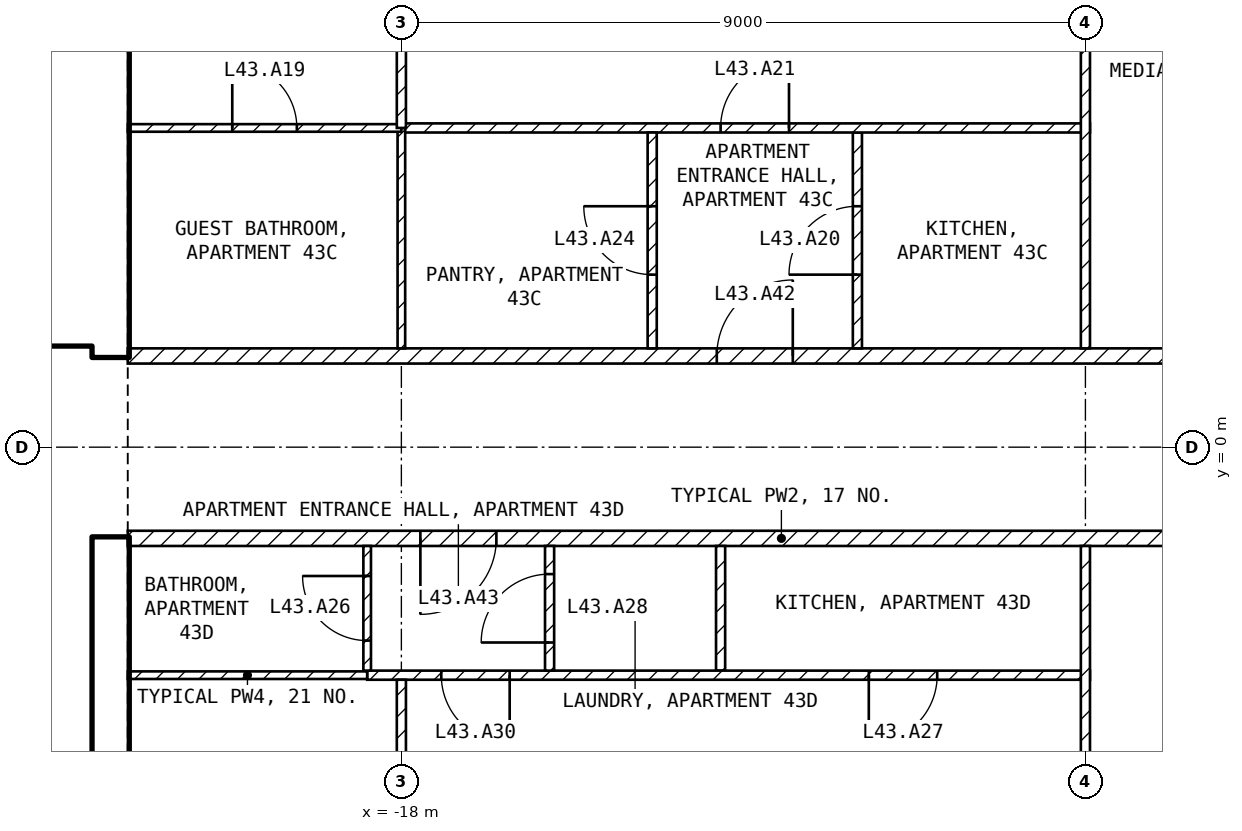
"""IFC4 building model, lengths in metres.
Left out: names, types, materials, properties, quantities, classifications, styles, units other than length and angle.
Written with IfcOpenShell. Run it as: python <this file> out.ifc"""

import sys

from ifc_helpers import new_model, si_unit, direction, frame, frame_2d, origin, place, context, subcontext, project, spatial, rectangle, extrude, element, fill, save


model = new_model("IFC4")
c1 = context("Model", 3, precision=1e-05, world=origin(), true_north=direction((0.0, 1.0)))
c2 = subcontext(c1, "Body", "Model", "MODEL_VIEW")
j1 = project(units=[si_unit("LENGTHUNIT", "METRE"), si_unit("PLANEANGLEUNIT", "RADIAN")], contexts=[c1])
p1 = place(None, origin())
s1 = spatial("IfcSite", under=j1, at=p1, CompositionType="ELEMENT")
p2 = place(p1, origin())
s2 = spatial("IfcBuilding", under=s1, at=p2, CompositionType="ELEMENT")
p3 = place(p2, frame((0.0, 0.0, 177.1)))
s3 = spatial("IfcBuildingStorey", under=s2, at=p3, CompositionType="ELEMENT", Elevation=177.1)
for number, where, z_axis, x_axis in (
    (1, (-21.825, -8.1, 0.0), (0.0, 0.0, 1.0), (0.0, 1.0, 0.0)),
    (2, (-21.825, 1.2, 0.0), (0.0, 0.0, 1.0), (0.0, 1.0, 0.0)),
):
    element("IfcWall", number, at=place(p3, frame(where, z_axis=z_axis, x_axis=x_axis)), inside=s3, PredefinedType="SHEAR", context=c2, shape_type="SweptSolid", body=[
        extrude(rectangle(XDim=6.9, YDim=0.45, at=frame_2d((3.45, 0.0))), origin(), (0.0, 0.0, 1.0), 3.25),
    ])
p4 = place(p3, frame((-33.2, 1.45, 0.0), z_axis=(0.0, 0.0, 1.0), x_axis=(1.0, 0.0, 0.0)))
e3 = element("IfcWall", 3, at=p4, inside=s3, PredefinedType="SOLIDWALL", context=c2, shape_type="SweptSolid", body=[
    extrude(rectangle(XDim=11.15, YDim=0.2, at=frame_2d((5.575, 0.0))), origin(), (0.0, 0.0, 1.0), 3.25),
])
p5 = place(p4, frame((9.4, 0.0, 0.0)))
e4 = element("IfcOpeningElement", 4, at=p5, cuts=e3, PredefinedType="OPENING", context=c2, shape_type="SweptSolid", body=[
    extrude(rectangle(XDim=1.0, YDim=2.1, at=frame_2d((0.5, 1.05))), frame((0.0, 0.11, 0.0), z_axis=(0.0, -1.0, 0.0), x_axis=(1.0, 0.0, 0.0)), (0.0, 0.0, 1.0), 0.22),
])
p6 = place(p4, frame((6.9, 0.0, 0.0)))
e5 = element("IfcOpeningElement", 5, at=p6, cuts=e3, PredefinedType="OPENING", context=c2, shape_type="SweptSolid", body=[
    extrude(rectangle(XDim=1.0, YDim=2.1, at=frame_2d((0.5, 1.05))), frame((0.0, 0.11, 0.0), z_axis=(0.0, -1.0, 0.0), x_axis=(1.0, 0.0, 0.0)), (0.0, 0.0, 1.0), 0.22),
])
p7 = place(p4, frame((1.1, 0.0, 0.0)))
e6 = element("IfcOpeningElement", 6, at=p7, cuts=e3, PredefinedType="OPENING", context=c2, shape_type="SweptSolid", body=[
    extrude(rectangle(XDim=0.9, YDim=2.1, at=frame_2d((0.45, 1.05))), frame((0.0, 0.11, 0.0), z_axis=(0.0, -1.0, 0.0), x_axis=(1.0, 0.0, 0.0)), (0.0, 0.0, 1.0), 0.22),
])
p8 = place(p3, frame((-28.35, 5.15, 0.0), z_axis=(0.0, 0.0, 1.0), x_axis=(1.0, 0.0, 0.0)))
e7 = element("IfcWall", 7, at=p8, inside=s3, PredefinedType="SOLIDWALL", context=c2, shape_type="SweptSolid", body=[
    extrude(rectangle(XDim=6.3, YDim=0.2, at=frame_2d((3.15, 0.0))), origin(), (0.0, 0.0, 1.0), 3.25),
])
p9 = place(p8, frame((5.1, 0.0, 0.0)))
e8 = element("IfcOpeningElement", 8, at=p9, cuts=e7, PredefinedType="OPENING", context=c2, shape_type="SweptSolid", body=[
    extrude(rectangle(XDim=1.0, YDim=2.1, at=frame_2d((0.5, 1.05))), frame((0.0, 0.11, 0.0), z_axis=(0.0, -1.0, 0.0), x_axis=(1.0, 0.0, 0.0)), (0.0, 0.0, 1.0), 0.22),
])
p10 = place(p3, frame((-21.6, 1.2, 0.0), z_axis=(0.0, 0.0, 1.0), x_axis=(1.0, 0.0, 0.0)))
e9 = element("IfcWall", 9, at=p10, inside=s3, PredefinedType="PARTITIONING", context=c2, shape_type="SweptSolid", body=[
    extrude(rectangle(XDim=17.2, YDim=0.2, at=frame_2d((8.6, 0.0))), origin(), (0.0, 0.0, 1.0), 3.25),
])
p11 = place(p10, frame((7.75, 0.0, 0.0)))
e10 = element("IfcOpeningElement", 10, at=p11, cuts=e9, PredefinedType="OPENING", context=c2, shape_type="SweptSolid", body=[
    extrude(rectangle(XDim=1.0, YDim=2.1, at=frame_2d((0.5, 1.05))), frame((0.0, 0.11, 0.0), z_axis=(0.0, -1.0, 0.0), x_axis=(1.0, 0.0, 0.0)), (0.0, 0.0, 1.0), 0.22),
])
p12 = place(p3, frame((-4.4, -1.2, 0.0), z_axis=(0.0, 0.0, 1.0), x_axis=(-1.0, 0.0, 0.0)))
e11 = element("IfcWall", 11, at=p12, inside=s3, PredefinedType="PARTITIONING", context=c2, shape_type="SweptSolid", body=[
    extrude(rectangle(XDim=17.2, YDim=0.2, at=frame_2d((8.6, 0.0))), origin(), (0.0, 0.0, 1.0), 3.25),
])
p13 = place(p12, frame((12.35, 0.0, 0.0)))
e12 = element("IfcOpeningElement", 12, at=p13, cuts=e11, PredefinedType="OPENING", context=c2, shape_type="SweptSolid", body=[
    extrude(rectangle(XDim=1.0, YDim=2.1, at=frame_2d((0.5, 1.05))), frame((0.0, 0.11, 0.0), z_axis=(0.0, -1.0, 0.0), x_axis=(1.0, 0.0, 0.0)), (0.0, 0.0, 1.0), 0.22),
])
p14 = place(p3, frame((-12.0, 1.3, 0.0), z_axis=(0.0, 0.0, 1.0), x_axis=(0.0, 1.0, 0.0)))
e13 = element("IfcWall", 13, at=p14, inside=s3, PredefinedType="PARTITIONING", context=c2, shape_type="SweptSolid", body=[
    extrude(rectangle(XDim=2.84, YDim=0.12, at=frame_2d((1.42, 0.0))), origin(), (0.0, 0.0, 1.0), 3.25),
])
p15 = place(p14, frame((0.97, 0.0, 0.0)))
e14 = element("IfcOpeningElement", 14, at=p15, cuts=e13, PredefinedType="OPENING", context=c2, shape_type="SweptSolid", body=[
    extrude(rectangle(XDim=0.9, YDim=2.1, at=frame_2d((0.45, 1.05))), frame((0.0, 0.07, 0.0), z_axis=(0.0, -1.0, 0.0), x_axis=(1.0, 0.0, 0.0)), (0.0, 0.0, 1.0), 0.14),
])
p16 = place(p3, frame((-18.0, 4.2, 0.0), z_axis=(0.0, 0.0, 1.0), x_axis=(1.0, 0.0, 0.0)))
e15 = element("IfcWall", 15, at=p16, inside=s3, PredefinedType="PARTITIONING", context=c2, shape_type="SweptSolid", body=[
    extrude(rectangle(XDim=9.06, YDim=0.12, at=frame_2d((4.53, 0.0))), origin(), (0.0, 0.0, 1.0), 3.25),
])
p17 = place(p16, frame((4.2, 0.0, 0.0)))
e16 = element("IfcOpeningElement", 16, at=p17, cuts=e15, PredefinedType="OPENING", context=c2, shape_type="SweptSolid", body=[
    extrude(rectangle(XDim=0.9, YDim=2.1, at=frame_2d((0.45, 1.05))), frame((0.0, 0.07, 0.0), z_axis=(0.0, -1.0, 0.0), x_axis=(1.0, 0.0, 0.0)), (0.0, 0.0, 1.0), 0.14),
])
p18 = place(p3, frame((-9.0, 8.92, 0.0), z_axis=(0.0, 0.0, 1.0), x_axis=(0.0, -1.0, 0.0)))
e17 = element("IfcWall", 17, at=p18, inside=s3, PredefinedType="PARTITIONING", context=c2, shape_type="SweptSolid", body=[
    extrude(rectangle(XDim=7.62, YDim=0.12, at=frame_2d((3.81, 0.0))), origin(), (0.0, 0.0, 1.0), 3.25),
])
p19 = place(p18, frame((2.52, 0.0, 0.0)))
e18 = element("IfcOpeningElement", 18, at=p19, cuts=e17, PredefinedType="OPENING", context=c2, shape_type="SweptSolid", body=[
    extrude(rectangle(XDim=0.9, YDim=2.1, at=frame_2d((0.45, 1.05))), frame((0.0, 0.07, 0.0), z_axis=(0.0, -1.0, 0.0), x_axis=(1.0, 0.0, 0.0)), (0.0, 0.0, 1.0), 0.14),
])
p20 = place(p3, frame((-14.7, 1.3, 0.0), z_axis=(0.0, 0.0, 1.0), x_axis=(0.0, 1.0, 0.0)))
e19 = element("IfcWall", 19, at=p20, inside=s3, PredefinedType="PARTITIONING", context=c2, shape_type="SweptSolid", body=[
    extrude(rectangle(XDim=2.84, YDim=0.12, at=frame_2d((1.42, 0.0))), origin(), (0.0, 0.0, 1.0), 3.25),
])
p21 = place(p20, frame((0.97, 0.0, 0.0)))
e20 = element("IfcOpeningElement", 20, at=p21, cuts=e19, PredefinedType="OPENING", context=c2, shape_type="SweptSolid", body=[
    extrude(rectangle(XDim=0.9, YDim=2.1, at=frame_2d((0.45, 1.05))), frame((0.0, 0.07, 0.0), z_axis=(0.0, -1.0, 0.0), x_axis=(1.0, 0.0, 0.0)), (0.0, 0.0, 1.0), 0.14),
])
p22 = place(p3, frame((-18.0, 1.3, 0.0), z_axis=(0.0, 0.0, 1.0), x_axis=(0.0, 1.0, 0.0)))
e21 = element("IfcWall", 21, at=p22, inside=s3, PredefinedType="PARTITIONING", context=c2, shape_type="SweptSolid", body=[
    extrude(rectangle(XDim=2.9, YDim=0.1, at=frame_2d((1.45, 0.0))), origin(), (0.0, 0.0, 1.0), 2.48),
])
p23 = place(p3, frame((-21.6, 4.2, 0.0), z_axis=(0.0, 0.0, 1.0), x_axis=(1.0, 0.0, 0.0)))
e22 = element("IfcWall", 22, at=p23, inside=s3, PredefinedType="PARTITIONING", context=c2, shape_type="SweptSolid", body=[
    extrude(rectangle(XDim=3.6, YDim=0.1, at=frame_2d((1.8, 0.0))), origin(), (0.0, 0.0, 1.0), 3.25),
])
p24 = place(p23, frame((1.375, 0.0, 0.0)))
e23 = element("IfcOpeningElement", 23, at=p24, cuts=e22, PredefinedType="OPENING", context=c2, shape_type="SweptSolid", body=[
    extrude(rectangle(XDim=0.85, YDim=2.1, at=frame_2d((0.425, 1.05))), frame((0.0, 0.06, 0.0), z_axis=(0.0, -1.0, 0.0), x_axis=(1.0, 0.0, 0.0)), (0.0, 0.0, 1.0), 0.12),
])
p25 = place(p3, frame((-18.0, 4.2, 0.0), z_axis=(0.0, 0.0, 1.0), x_axis=(0.0, 1.0, 0.0)))
e24 = element("IfcWall", 24, at=p25, inside=s3, PredefinedType="PARTITIONING", context=c2, shape_type="SweptSolid", body=[
    extrude(rectangle(XDim=4.72, YDim=0.12, at=frame_2d((2.36, 0.0))), origin(), (0.0, 0.0, 1.0), 2.48),
])
p26 = place(p25, frame((1.3, 0.0, 0.0)))
e25 = element("IfcOpeningElement", 25, at=p26, cuts=e24, PredefinedType="OPENING", context=c2, shape_type="SweptSolid", body=[
    extrude(rectangle(XDim=0.9, YDim=2.1, at=frame_2d((0.45, 1.05))), frame((0.0, 0.07, 0.0), z_axis=(0.0, -1.0, 0.0), x_axis=(1.0, 0.0, 0.0)), (0.0, 0.0, 1.0), 0.14),
])
p27 = place(p3, frame((-13.8, -2.94, 0.0), z_axis=(0.0, 0.0, 1.0), x_axis=(0.0, 1.0, 0.0)))
e26 = element("IfcWall", 26, at=p27, inside=s3, PredefinedType="PARTITIONING", context=c2, shape_type="SweptSolid", body=[
    extrude(rectangle(XDim=1.64, YDim=0.12, at=frame_2d((0.82, 0.0))), origin(), (0.0, 0.0, 1.0), 3.25),
])
p28 = place(p3, frame((-8.94, -3.0, 0.0), z_axis=(0.0, 0.0, 1.0), x_axis=(-1.0, 0.0, 0.0)))
e27 = element("IfcWall", 27, at=p28, inside=s3, PredefinedType="PARTITIONING", context=c2, shape_type="SweptSolid", body=[
    extrude(rectangle(XDim=9.51, YDim=0.12, at=frame_2d((4.755, 0.0))), origin(), (0.0, 0.0, 1.0), 3.25),
])
p29 = place(p28, frame((2.01, 0.0, 0.0)))
e28 = element("IfcOpeningElement", 28, at=p29, cuts=e27, PredefinedType="OPENING", context=c2, shape_type="SweptSolid", body=[
    extrude(rectangle(XDim=0.9, YDim=2.1, at=frame_2d((0.45, 1.05))), frame((0.0, 0.07, 0.0), z_axis=(0.0, -1.0, 0.0), x_axis=(1.0, 0.0, 0.0)), (0.0, 0.0, 1.0), 0.14),
])
p30 = place(p28, frame((7.635, 0.0, 0.0)))
e29 = element("IfcOpeningElement", 29, at=p30, cuts=e27, PredefinedType="OPENING", context=c2, shape_type="SweptSolid", body=[
    extrude(rectangle(XDim=0.9, YDim=2.1, at=frame_2d((0.45, 1.05))), frame((0.0, 0.07, 0.0), z_axis=(0.0, -1.0, 0.0), x_axis=(1.0, 0.0, 0.0)), (0.0, 0.0, 1.0), 0.14),
])
p31 = place(p3, frame((-9.0, -1.3, 0.0), z_axis=(0.0, 0.0, 1.0), x_axis=(0.0, -1.0, 0.0)))
e30 = element("IfcWall", 30, at=p31, inside=s3, PredefinedType="PARTITIONING", context=c2, shape_type="SweptSolid", body=[
    extrude(rectangle(XDim=7.62, YDim=0.12, at=frame_2d((3.81, 0.0))), origin(), (0.0, 0.0, 1.0), 3.25),
])
p32 = place(p31, frame((4.1, 0.0, 0.0)))
e31 = element("IfcOpeningElement", 31, at=p32, cuts=e30, PredefinedType="OPENING", context=c2, shape_type="SweptSolid", body=[
    extrude(rectangle(XDim=0.9, YDim=2.1, at=frame_2d((0.45, 1.05))), frame((0.0, 0.07, 0.0), z_axis=(0.0, -1.0, 0.0), x_axis=(1.0, 0.0, 0.0)), (0.0, 0.0, 1.0), 0.14),
])
p33 = place(p3, frame((-16.05, -2.94, 0.0), z_axis=(0.0, 0.0, 1.0), x_axis=(0.0, 1.0, 0.0)))
e32 = element("IfcWall", 32, at=p33, inside=s3, PredefinedType="PARTITIONING", context=c2, shape_type="SweptSolid", body=[
    extrude(rectangle(XDim=1.64, YDim=0.12, at=frame_2d((0.82, 0.0))), origin(), (0.0, 0.0, 1.0), 3.25),
])
p34 = place(p33, frame((0.37, 0.0, 0.0)))
e33 = element("IfcOpeningElement", 33, at=p34, cuts=e32, PredefinedType="OPENING", context=c2, shape_type="SweptSolid", body=[
    extrude(rectangle(XDim=0.9, YDim=2.1, at=frame_2d((0.45, 1.05))), frame((0.0, 0.07, 0.0), z_axis=(0.0, -1.0, 0.0), x_axis=(1.0, 0.0, 0.0)), (0.0, 0.0, 1.0), 0.14),
])
p35 = place(p3, frame((-18.45, -2.94, 0.0), z_axis=(0.0, 0.0, 1.0), x_axis=(0.0, 1.0, 0.0)))
e34 = element("IfcWall", 34, at=p35, inside=s3, PredefinedType="PARTITIONING", context=c2, shape_type="SweptSolid", body=[
    extrude(rectangle(XDim=1.64, YDim=0.1, at=frame_2d((0.82, 0.0))), origin(), (0.0, 0.0, 1.0), 3.25),
])
p36 = place(p35, frame((0.395, 0.0, 0.0)))
e35 = element("IfcOpeningElement", 35, at=p36, cuts=e34, PredefinedType="OPENING", context=c2, shape_type="SweptSolid", body=[
    extrude(rectangle(XDim=0.85, YDim=2.1, at=frame_2d((0.425, 1.05))), frame((0.0, 0.06, 0.0), z_axis=(0.0, -1.0, 0.0), x_axis=(1.0, 0.0, 0.0)), (0.0, 0.0, 1.0), 0.12),
])
p37 = place(p3, frame((-18.45, -3.0, 0.0), z_axis=(0.0, 0.0, 1.0), x_axis=(-1.0, 0.0, 0.0)))
e36 = element("IfcWall", 36, at=p37, inside=s3, PredefinedType="PARTITIONING", context=c2, shape_type="SweptSolid", body=[
    extrude(rectangle(XDim=3.15, YDim=0.1, at=frame_2d((1.575, 0.0))), origin(), (0.0, 0.0, 1.0), 3.25),
])
p38 = place(p3, frame((-18.0, -8.92, 0.0), z_axis=(0.0, 0.0, 1.0), x_axis=(0.0, 1.0, 0.0)))
e37 = element("IfcWall", 37, at=p38, inside=s3, PredefinedType="PARTITIONING", context=c2, shape_type="SweptSolid", body=[
    extrude(rectangle(XDim=5.86, YDim=0.12, at=frame_2d((2.93, 0.0))), origin(), (0.0, 0.0, 1.0), 2.48),
])
p39 = place(p38, frame((2.59, 0.0, 0.0)))
e38 = element("IfcOpeningElement", 38, at=p39, cuts=e37, PredefinedType="OPENING", context=c2, shape_type="SweptSolid", body=[
    extrude(rectangle(XDim=0.9, YDim=2.1, at=frame_2d((0.45, 1.05))), frame((0.0, 0.07, 0.0), z_axis=(0.0, -1.0, 0.0), x_axis=(1.0, 0.0, 0.0)), (0.0, 0.0, 1.0), 0.14),
])
p40 = place(p9, origin())
e39 = element("IfcDoor", 39, at=p40, inside=s3, OperationType="SINGLE_SWING_LEFT", PredefinedType="DOOR", context=c2, shape_type="SweptSolid", body=[
    extrude(rectangle(XDim=1.0, YDim=2.1, at=frame_2d((0.5, 1.05))), frame((0.0, 0.025, 0.0), z_axis=(0.0, -1.0, 0.0), x_axis=(1.0, 0.0, 0.0)), (0.0, 0.0, 1.0), 0.05),
])
fill(e8, e39)
p41 = place(p24, origin())
e40 = element("IfcDoor", 40, at=p41, inside=s3, OperationType="SINGLE_SWING_LEFT", PredefinedType="DOOR", context=c2, shape_type="SweptSolid", body=[
    extrude(rectangle(XDim=0.85, YDim=2.1, at=frame_2d((0.425, 1.05))), frame((0.0, 0.025, 0.0), z_axis=(0.0, -1.0, 0.0), x_axis=(1.0, 0.0, 0.0)), (0.0, 0.0, 1.0), 0.05),
])
fill(e23, e40)
p42 = place(p15, origin())
e41 = element("IfcDoor", 41, at=p42, inside=s3, OperationType="SINGLE_SWING_LEFT", PredefinedType="DOOR", context=c2, shape_type="SweptSolid", body=[
    extrude(rectangle(XDim=0.9, YDim=2.1, at=frame_2d((0.45, 1.05))), frame((0.0, 0.025, 0.0), z_axis=(0.0, -1.0, 0.0), x_axis=(1.0, 0.0, 0.0)), (0.0, 0.0, 1.0), 0.05),
])
fill(e14, e41)
p43 = place(p17, origin())
e42 = element("IfcDoor", 42, at=p43, inside=s3, OperationType="SINGLE_SWING_RIGHT", PredefinedType="DOOR", context=c2, shape_type="SweptSolid", body=[
    extrude(rectangle(XDim=0.9, YDim=2.1, at=frame_2d((0.45, 1.05))), frame((0.0, 0.025, 0.0), z_axis=(0.0, -1.0, 0.0), x_axis=(1.0, 0.0, 0.0)), (0.0, 0.0, 1.0), 0.05),
])
fill(e16, e42)
p44 = place(p21, origin())
e43 = element("IfcDoor", 43, at=p44, inside=s3, OperationType="SINGLE_SWING_RIGHT", PredefinedType="DOOR", context=c2, shape_type="SweptSolid", body=[
    extrude(rectangle(XDim=0.9, YDim=2.1, at=frame_2d((0.45, 1.05))), frame((0.0, 0.025, 0.0), z_axis=(0.0, -1.0, 0.0), x_axis=(1.0, 0.0, 0.0)), (0.0, 0.0, 1.0), 0.05),
])
fill(e20, e43)
p45 = place(p36, origin())
e44 = element("IfcDoor", 44, at=p45, inside=s3, OperationType="SINGLE_SWING_RIGHT", PredefinedType="DOOR", context=c2, shape_type="SweptSolid", body=[
    extrude(rectangle(XDim=0.85, YDim=2.1, at=frame_2d((0.425, 1.05))), frame((0.0, 0.025, 0.0), z_axis=(0.0, -1.0, 0.0), x_axis=(1.0, 0.0, 0.0)), (0.0, 0.0, 1.0), 0.05),
])
fill(e35, e44)
p46 = place(p29, origin())
e45 = element("IfcDoor", 45, at=p46, inside=s3, OperationType="SINGLE_SWING_RIGHT", PredefinedType="DOOR", context=c2, shape_type="SweptSolid", body=[
    extrude(rectangle(XDim=0.9, YDim=2.1, at=frame_2d((0.45, 1.05))), frame((0.0, 0.025, 0.0), z_axis=(0.0, -1.0, 0.0), x_axis=(1.0, 0.0, 0.0)), (0.0, 0.0, 1.0), 0.05),
])
fill(e28, e45)
p47 = place(p34, origin())
e46 = element("IfcDoor", 46, at=p47, inside=s3, OperationType="SINGLE_SWING_LEFT", PredefinedType="DOOR", context=c2, shape_type="SweptSolid", body=[
    extrude(rectangle(XDim=0.9, YDim=2.1, at=frame_2d((0.45, 1.05))), frame((0.0, 0.025, 0.0), z_axis=(0.0, -1.0, 0.0), x_axis=(1.0, 0.0, 0.0)), (0.0, 0.0, 1.0), 0.05),
])
fill(e33, e46)
p48 = place(p30, origin())
e47 = element("IfcDoor", 47, at=p48, inside=s3, OperationType="SINGLE_SWING_LEFT", PredefinedType="DOOR", context=c2, shape_type="SweptSolid", body=[
    extrude(rectangle(XDim=0.9, YDim=2.1, at=frame_2d((0.45, 1.05))), frame((0.0, 0.025, 0.0), z_axis=(0.0, -1.0, 0.0), x_axis=(1.0, 0.0, 0.0)), (0.0, 0.0, 1.0), 0.05),
])
fill(e29, e47)
p49 = place(p11, origin())
e48 = element("IfcDoor", 48, at=p49, inside=s3, OperationType="SINGLE_SWING_RIGHT", PredefinedType="DOOR", context=c2, shape_type="SweptSolid", body=[
    extrude(rectangle(XDim=1.0, YDim=2.1, at=frame_2d((0.5, 1.05))), frame((0.0, 0.025, 0.0), z_axis=(0.0, -1.0, 0.0), x_axis=(1.0, 0.0, 0.0)), (0.0, 0.0, 1.0), 0.05),
])
fill(e10, e48)
p50 = place(p13, origin())
e49 = element("IfcDoor", 49, at=p50, inside=s3, OperationType="SINGLE_SWING_RIGHT", PredefinedType="DOOR", context=c2, shape_type="SweptSolid", body=[
    extrude(rectangle(XDim=1.0, YDim=2.1, at=frame_2d((0.5, 1.05))), frame((0.0, 0.025, 0.0), z_axis=(0.0, -1.0, 0.0), x_axis=(1.0, 0.0, 0.0)), (0.0, 0.0, 1.0), 0.05),
])
fill(e12, e49)
save(model, sys.argv[1])
